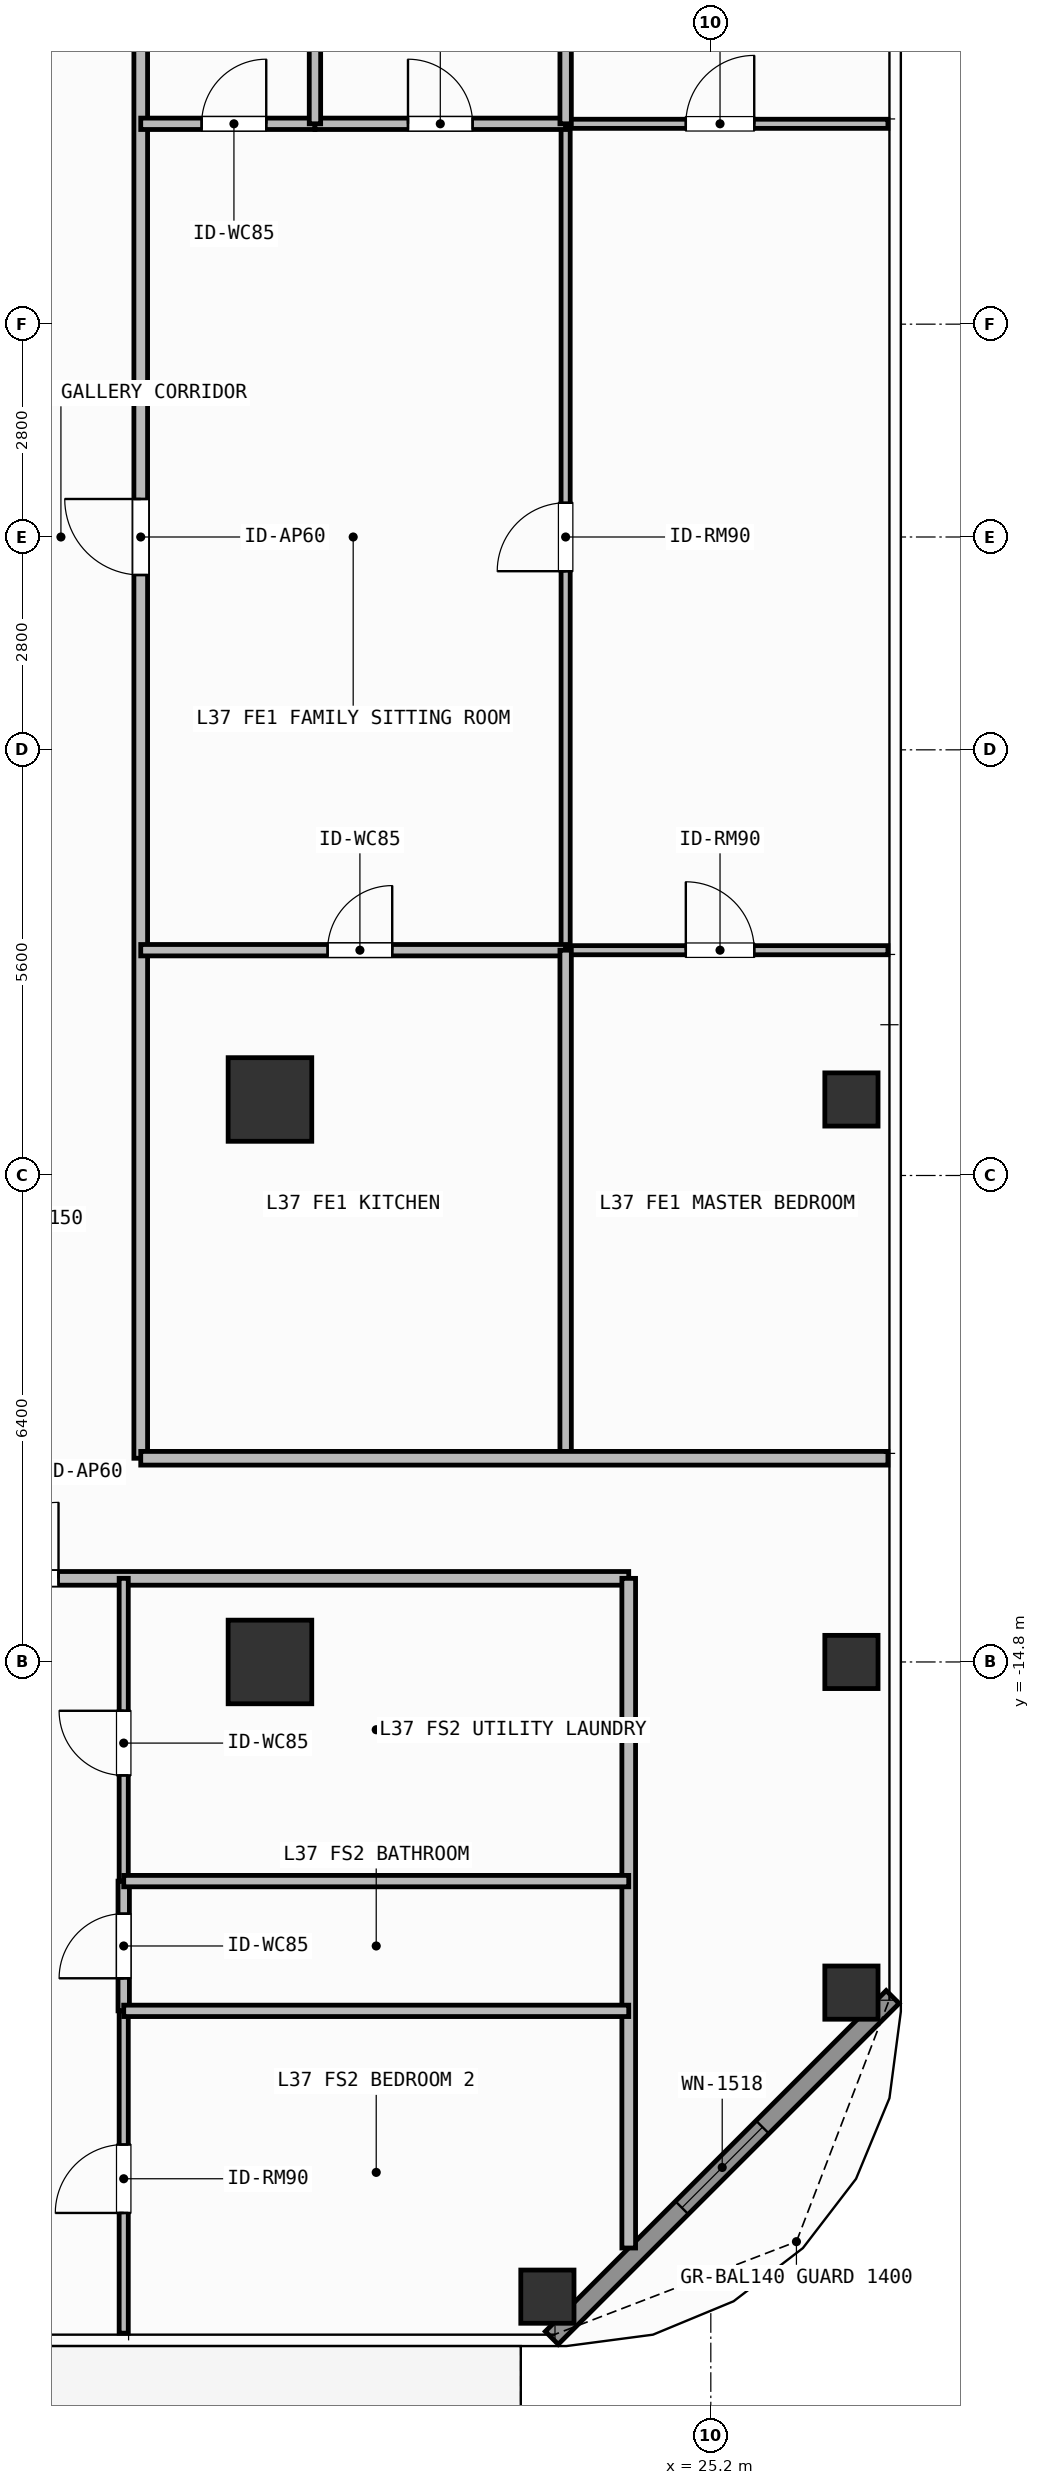
"""IFC4 building model, lengths in metres.
Left out: names, types, materials, properties, quantities, classifications, styles, units other than length and angle.
Written with IfcOpenShell. Run it as: python <this file> out.ifc"""

import sys

from ifc_helpers import new_model, si_unit, direction, frame, frame_2d, origin, origin_2d, place, context, subcontext, project, spatial, rectangle, hollow_rectangle, extrude, element, fill, save


model = new_model("IFC4")
c1 = context("Model", 3, precision=1e-05, world=origin(), true_north=direction((0.0, 1.0)))
c2 = subcontext(c1, "Body", "Model", "MODEL_VIEW")
j1 = project(units=[si_unit("LENGTHUNIT", "METRE"), si_unit("PLANEANGLEUNIT", "RADIAN")], contexts=[c1])
p1 = place(None, origin())
s1 = spatial("IfcSite", under=j1, at=p1, CompositionType="ELEMENT")
p2 = place(p1, origin())
s2 = spatial("IfcBuilding", under=s1, at=p2, CompositionType="ELEMENT")
p3 = place(p2, frame((0.0, 0.0, 148.5)))
s3 = spatial("IfcBuildingStorey", under=s2, at=p3, CompositionType="ELEMENT", Elevation=148.5)
for number, where, z_axis, x_axis in (
    (1, (19.4, -14.8, 0.0), (0.0, 0.0, 1.0), (1.0, 0.0, 0.0)),
    (2, (19.4, -7.4, 0.0), (0.0, 0.0, 1.0), (1.0, 0.0, 0.0)),
):
    element("IfcColumn", number, at=place(p3, frame(where, z_axis=z_axis, x_axis=x_axis)), inside=s3, PredefinedType="COLUMN", context=c2, shape_type="SweptSolid", body=[
        extrude(rectangle(XDim=1.1, YDim=1.1, at=origin_2d()), origin(), (0.0, 0.0, 1.0), 3.9),
    ])
for number, where, z_axis, x_axis in (
    (3, (23.05, -23.15, 0.0), (0.0, 0.0, 1.0), (1.0, 0.0, 0.0)),
    (4, (27.05, -19.15, 0.0), (0.0, 0.0, 1.0), (1.0, 0.0, 0.0)),
    (5, (27.05, -14.8, 0.0), (0.0, 0.0, 1.0), (1.0, 0.0, 0.0)),
    (6, (27.05, -7.4, 0.0), (0.0, 0.0, 1.0), (1.0, 0.0, 0.0)),
):
    element("IfcColumn", number, at=place(p3, frame(where, z_axis=z_axis, x_axis=x_axis)), inside=s3, PredefinedType="COLUMN", context=c2, shape_type="SweptSolid", body=[
        extrude(hollow_rectangle(XDim=0.7, YDim=0.7, WallThickness=0.032, at=origin_2d()), origin(), (0.0, 0.0, 1.0), 3.9),
    ])
p4 = place(p3, frame((27.592, -19.208, 0.0), z_axis=(0.0, 0.0, 1.0), x_axis=(-0.707087534163, -0.707126027686, 0.0)))
e7 = element("IfcWall", 7, at=p4, inside=s3, PredefinedType="SOLIDWALL", context=c2, shape_type="SweptSolid", body=[
    extrude(rectangle(XDim=6.342, YDim=0.24, at=frame_2d((3.171, 0.0))), origin(), (0.0, 0.0, 1.0), 3.68),
])
p5 = place(p4, frame((2.421, 0.0, 0.8)))
e8 = element("IfcOpeningElement", 8, at=p5, cuts=e7, PredefinedType="OPENING", context=c2, shape_type="SweptSolid", body=[
    extrude(rectangle(XDim=1.5, YDim=1.85, at=frame_2d((0.75, 0.925))), frame((0.0, 0.13, 0.0), z_axis=(0.0, -1.0, 0.0), x_axis=(1.0, 0.0, 0.0)), (0.0, 0.0, 1.0), 0.26),
])
p6 = place(p3, frame((6.326, -13.7, 0.0), z_axis=(0.0, 0.0, 1.0), x_axis=(1.0, 0.0, 0.0)))
e9 = element("IfcWall", 9, at=p6, inside=s3, PredefinedType="PARTITIONING", context=c2, shape_type="SweptSolid", body=[
    extrude(rectangle(XDim=17.794, YDim=0.18, at=frame_2d((8.897, 0.0))), origin(), (0.0, 0.0, 1.0), 3.68),
])
p7 = place(p6, frame((9.292, 0.0, 0.0)))
e10 = element("IfcOpeningElement", 10, at=p7, cuts=e9, PredefinedType="OPENING", context=c2, shape_type="SweptSolid", body=[
    extrude(rectangle(XDim=1.0, YDim=2.2, at=frame_2d((0.5, 1.1))), frame((0.0, 0.1, 0.0), z_axis=(0.0, -1.0, 0.0), x_axis=(1.0, 0.0, 0.0)), (0.0, 0.0, 1.0), 0.2),
])
p8 = place(p3, frame((17.476, -19.39, 0.0), z_axis=(0.0, 0.0, 1.0), x_axis=(0.0, 1.0, 0.0)))
e11 = element("IfcWall", 11, at=p8, inside=s3, PredefinedType="PARTITIONING", context=c2, shape_type="SweptSolid", body=[
    extrude(rectangle(XDim=1.707, YDim=0.15, at=frame_2d((0.854, 0.0))), origin(), (0.0, 0.0, 1.0), 3.68),
])
p9 = place(p8, frame((0.428, 0.0, 0.0)))
e12 = element("IfcOpeningElement", 12, at=p9, cuts=e11, PredefinedType="OPENING", context=c2, shape_type="SweptSolid", body=[
    extrude(rectangle(XDim=0.85, YDim=2.1, at=frame_2d((0.425, 1.05))), frame((0.0, 0.085, 0.0), z_axis=(0.0, -1.0, 0.0), x_axis=(1.0, 0.0, 0.0)), (0.0, 0.0, 1.0), 0.17),
])
p10 = place(p3, frame((17.476, -17.683, 0.0), z_axis=(0.0, 0.0, 1.0), x_axis=(0.0, 1.0, 0.0)))
e13 = element("IfcWall", 13, at=p10, inside=s3, PredefinedType="PARTITIONING", context=c2, shape_type="SweptSolid", body=[
    extrude(rectangle(XDim=3.983, YDim=0.12, at=frame_2d((1.992, 0.0))), origin(), (0.0, 0.0, 1.0), 3.68),
])
p11 = place(p10, frame((1.391, 0.0, 0.0)))
e14 = element("IfcOpeningElement", 14, at=p11, cuts=e13, PredefinedType="OPENING", context=c2, shape_type="SweptSolid", body=[
    extrude(rectangle(XDim=0.85, YDim=2.1, at=frame_2d((0.425, 1.05))), frame((0.0, 0.07, 0.0), z_axis=(0.0, -1.0, 0.0), x_axis=(1.0, 0.0, 0.0)), (0.0, 0.0, 1.0), 0.14),
])
p12 = place(p3, frame((17.476, -23.63, 0.0), z_axis=(0.0, 0.0, 1.0), x_axis=(0.0, 1.0, 0.0)))
e15 = element("IfcWall", 15, at=p12, inside=s3, PredefinedType="PARTITIONING", context=c2, shape_type="SweptSolid", body=[
    extrude(rectangle(XDim=4.24, YDim=0.12, at=frame_2d((2.12, 0.0))), origin(), (0.0, 0.0, 1.0), 3.68),
])
p13 = place(p12, frame((1.581, 0.0, 0.0)))
e16 = element("IfcOpeningElement", 16, at=p13, cuts=e15, PredefinedType="OPENING", context=c2, shape_type="SweptSolid", body=[
    extrude(rectangle(XDim=0.9, YDim=2.1, at=frame_2d((0.45, 1.05))), frame((0.0, 0.07, 0.0), z_axis=(0.0, -1.0, 0.0), x_axis=(1.0, 0.0, 0.0)), (0.0, 0.0, 1.0), 0.14),
])
p14 = place(p3, frame((17.7, -12.12, 0.0), z_axis=(0.0, 0.0, 1.0), x_axis=(0.0, 1.0, 0.0)))
e17 = element("IfcWall", 17, at=p14, inside=s3, PredefinedType="PARTITIONING", context=c2, shape_type="SweptSolid", body=[
    extrude(rectangle(XDim=24.24, YDim=0.18, at=frame_2d((12.12, 0.0))), origin(), (0.0, 0.0, 1.0), 3.68),
])
p15 = place(p14, frame((11.62, 0.0, 0.0)))
e18 = element("IfcOpeningElement", 18, at=p15, cuts=e17, PredefinedType="OPENING", context=c2, shape_type="SweptSolid", body=[
    extrude(rectangle(XDim=1.0, YDim=2.2, at=frame_2d((0.5, 1.1))), frame((0.0, 0.1, 0.0), z_axis=(0.0, -1.0, 0.0), x_axis=(1.0, 0.0, 0.0)), (0.0, 0.0, 1.0), 0.2),
])
p16 = place(p3, frame((23.29, -5.436, 0.0), z_axis=(0.0, 0.0, 1.0), x_axis=(0.0, 1.0, 0.0)))
e19 = element("IfcWall", 19, at=p16, inside=s3, PredefinedType="PARTITIONING", context=c2, shape_type="SweptSolid", body=[
    extrude(rectangle(XDim=10.872, YDim=0.12, at=frame_2d((5.436, 0.0))), origin(), (0.0, 0.0, 1.0), 3.68),
])
p17 = place(p16, frame((4.986, 0.0, 0.0)))
e20 = element("IfcOpeningElement", 20, at=p17, cuts=e19, PredefinedType="OPENING", context=c2, shape_type="SweptSolid", body=[
    extrude(rectangle(XDim=0.9, YDim=2.1, at=frame_2d((0.45, 1.05))), frame((0.0, 0.07, 0.0), z_axis=(0.0, -1.0, 0.0), x_axis=(1.0, 0.0, 0.0)), (0.0, 0.0, 1.0), 0.14),
])
p18 = place(p3, frame((17.7, 5.436, 0.0), z_axis=(0.0, 0.0, 1.0), x_axis=(1.0, 0.0, 0.0)))
e21 = element("IfcWall", 21, at=p18, inside=s3, PredefinedType="PARTITIONING", context=c2, shape_type="SweptSolid", body=[
    extrude(rectangle(XDim=2.292, YDim=0.15, at=frame_2d((1.146, 0.0))), origin(), (0.0, 0.0, 1.0), 3.68),
])
p19 = place(p18, frame((0.801, 0.0, 0.0)))
e22 = element("IfcOpeningElement", 22, at=p19, cuts=e21, PredefinedType="OPENING", context=c2, shape_type="SweptSolid", body=[
    extrude(rectangle(XDim=0.85, YDim=2.1, at=frame_2d((0.425, 1.05))), frame((0.0, 0.085, 0.0), z_axis=(0.0, -1.0, 0.0), x_axis=(1.0, 0.0, 0.0)), (0.0, 0.0, 1.0), 0.17),
])
p20 = place(p3, frame((19.992, 5.436, 0.0), z_axis=(0.0, 0.0, 1.0), x_axis=(1.0, 0.0, 0.0)))
e23 = element("IfcWall", 23, at=p20, inside=s3, PredefinedType="PARTITIONING", context=c2, shape_type="SweptSolid", body=[
    extrude(rectangle(XDim=3.298, YDim=0.15, at=frame_2d((1.649, 0.0))), origin(), (0.0, 0.0, 1.0), 3.68),
])
p21 = place(p20, frame((1.224, 0.0, 0.0)))
e24 = element("IfcOpeningElement", 24, at=p21, cuts=e23, PredefinedType="OPENING", context=c2, shape_type="SweptSolid", body=[
    extrude(rectangle(XDim=0.85, YDim=2.1, at=frame_2d((0.425, 1.05))), frame((0.0, 0.085, 0.0), z_axis=(0.0, -1.0, 0.0), x_axis=(1.0, 0.0, 0.0)), (0.0, 0.0, 1.0), 0.17),
])
p22 = place(p3, frame((17.7, -5.436, 0.0), z_axis=(0.0, 0.0, 1.0), x_axis=(1.0, 0.0, 0.0)))
e25 = element("IfcWall", 25, at=p22, inside=s3, PredefinedType="PARTITIONING", context=c2, shape_type="SweptSolid", body=[
    extrude(rectangle(XDim=5.59, YDim=0.15, at=frame_2d((2.795, 0.0))), origin(), (0.0, 0.0, 1.0), 3.68),
])
p23 = place(p22, frame((2.458, 0.0, 0.0)))
e26 = element("IfcOpeningElement", 26, at=p23, cuts=e25, PredefinedType="OPENING", context=c2, shape_type="SweptSolid", body=[
    extrude(rectangle(XDim=0.85, YDim=2.1, at=frame_2d((0.425, 1.05))), frame((0.0, 0.085, 0.0), z_axis=(0.0, -1.0, 0.0), x_axis=(1.0, 0.0, 0.0)), (0.0, 0.0, 1.0), 0.17),
])
p24 = place(p3, frame((23.29, -5.436, 0.0), z_axis=(0.0, 0.0, 1.0), x_axis=(1.0, 0.0, 0.0)))
e27 = element("IfcWall", 27, at=p24, inside=s3, PredefinedType="PARTITIONING", context=c2, shape_type="SweptSolid", body=[
    extrude(rectangle(XDim=4.24, YDim=0.12, at=frame_2d((2.12, 0.0))), origin(), (0.0, 0.0, 1.0), 3.68),
])
p25 = place(p24, frame((1.581, 0.0, 0.0)))
e28 = element("IfcOpeningElement", 28, at=p25, cuts=e27, PredefinedType="OPENING", context=c2, shape_type="SweptSolid", body=[
    extrude(rectangle(XDim=0.9, YDim=2.1, at=frame_2d((0.45, 1.05))), frame((0.0, 0.07, 0.0), z_axis=(0.0, -1.0, 0.0), x_axis=(1.0, 0.0, 0.0)), (0.0, 0.0, 1.0), 0.14),
])
p26 = place(p3, frame((23.29, 5.436, 0.0), z_axis=(0.0, 0.0, 1.0), x_axis=(1.0, 0.0, 0.0)))
e29 = element("IfcWall", 29, at=p26, inside=s3, PredefinedType="PARTITIONING", context=c2, shape_type="SweptSolid", body=[
    extrude(rectangle(XDim=4.24, YDim=0.12, at=frame_2d((2.12, 0.0))), origin(), (0.0, 0.0, 1.0), 3.68),
])
p27 = place(p26, frame((1.581, 0.0, 0.0)))
e30 = element("IfcOpeningElement", 30, at=p27, cuts=e29, PredefinedType="OPENING", context=c2, shape_type="SweptSolid", body=[
    extrude(rectangle(XDim=0.9, YDim=2.1, at=frame_2d((0.45, 1.05))), frame((0.0, 0.07, 0.0), z_axis=(0.0, -1.0, 0.0), x_axis=(1.0, 0.0, 0.0)), (0.0, 0.0, 1.0), 0.14),
])
p28 = place(p3, frame((24.12, -22.51, 0.0), z_axis=(0.0, 0.0, 1.0), x_axis=(0.0, 1.0, 0.0)))
e31 = element("IfcWall", 31, at=p28, inside=s3, PredefinedType="PARTITIONING", context=c2, shape_type="SweptSolid", body=[
    extrude(rectangle(XDim=8.81, YDim=0.18, at=frame_2d((4.405, 0.0))), origin(), (0.0, 0.0, 1.0), 3.68),
])
for number, where, z_axis, x_axis in (
    (32, (17.476, -17.683, 0.0), (0.0, 0.0, 1.0), (1.0, 0.0, 0.0)),
    (33, (17.476, -19.39, 0.0), (0.0, 0.0, 1.0), (1.0, 0.0, 0.0)),
):
    element("IfcWall", number, at=place(p3, frame(where, z_axis=z_axis, x_axis=x_axis)), inside=s3, PredefinedType="PARTITIONING", context=c2, shape_type="SweptSolid", body=[
        extrude(rectangle(XDim=6.644, YDim=0.15, at=frame_2d((3.322, 0.0))), origin(), (0.0, 0.0, 1.0), 3.68),
    ])
for number, where, z_axis, x_axis in (
    (34, (19.992, 5.436, 0.0), (0.0, 0.0, 1.0), (0.0, 1.0, 0.0)),
    (35, (23.29, -12.12, 0.0), (0.0, 0.0, 1.0), (0.0, 1.0, 0.0)),
    (36, (23.29, 5.436, 0.0), (0.0, 0.0, 1.0), (0.0, 1.0, 0.0)),
):
    element("IfcWall", number, at=place(p3, frame(where, z_axis=z_axis, x_axis=x_axis)), inside=s3, PredefinedType="PARTITIONING", context=c2, shape_type="SweptSolid", body=[
        extrude(rectangle(XDim=6.684, YDim=0.15, at=frame_2d((3.342, 0.0))), origin(), (0.0, 0.0, 1.0), 3.68),
    ])
p29 = place(p3, frame((17.7, -12.12, 0.0), z_axis=(0.0, 0.0, 1.0), x_axis=(1.0, 0.0, 0.0)))
e37 = element("IfcWall", 37, at=p29, inside=s3, PredefinedType="PARTITIONING", context=c2, shape_type="SweptSolid", body=[
    extrude(rectangle(XDim=9.83, YDim=0.18, at=frame_2d((4.915, 0.0))), origin(), (0.0, 0.0, 1.0), 3.68),
])
p30 = place(p5, origin())
e38 = element("IfcWindow", 38, at=p30, inside=s3, PartitioningType="SINGLE_PANEL", PredefinedType="WINDOW", context=c2, shape_type="SweptSolid", body=[
    extrude(rectangle(XDim=1.5, YDim=1.85, at=frame_2d((0.75, 0.925))), frame((0.0, 0.03, 0.0), z_axis=(0.0, -1.0, 0.0), x_axis=(1.0, 0.0, 0.0)), (0.0, 0.0, 1.0), 0.06),
])
fill(e8, e38)
p31 = place(p7, origin())
e39 = element("IfcDoor", 39, at=p31, inside=s3, OperationType="SINGLE_SWING_RIGHT", PredefinedType="DOOR", context=c2, shape_type="SweptSolid", body=[
    extrude(rectangle(XDim=1.0, YDim=2.2, at=frame_2d((0.5, 1.1))), frame((0.0, 0.025, 0.0), z_axis=(0.0, -1.0, 0.0), x_axis=(1.0, 0.0, 0.0)), (0.0, 0.0, 1.0), 0.05),
])
fill(e10, e39)
p32 = place(p9, origin())
e40 = element("IfcDoor", 40, at=p32, inside=s3, OperationType="SINGLE_SWING_LEFT", PredefinedType="DOOR", context=c2, shape_type="SweptSolid", body=[
    extrude(rectangle(XDim=0.85, YDim=2.1, at=frame_2d((0.425, 1.05))), frame((0.0, 0.025, 0.0), z_axis=(0.0, -1.0, 0.0), x_axis=(1.0, 0.0, 0.0)), (0.0, 0.0, 1.0), 0.05),
])
fill(e12, e40)
p33 = place(p11, origin())
e41 = element("IfcDoor", 41, at=p33, inside=s3, OperationType="SINGLE_SWING_RIGHT", PredefinedType="DOOR", context=c2, shape_type="SweptSolid", body=[
    extrude(rectangle(XDim=0.85, YDim=2.1, at=frame_2d((0.425, 1.05))), frame((0.0, 0.025, 0.0), z_axis=(0.0, -1.0, 0.0), x_axis=(1.0, 0.0, 0.0)), (0.0, 0.0, 1.0), 0.05),
])
fill(e14, e41)
p34 = place(p13, origin())
e42 = element("IfcDoor", 42, at=p34, inside=s3, OperationType="SINGLE_SWING_LEFT", PredefinedType="DOOR", context=c2, shape_type="SweptSolid", body=[
    extrude(rectangle(XDim=0.9, YDim=2.1, at=frame_2d((0.45, 1.05))), frame((0.0, 0.025, 0.0), z_axis=(0.0, -1.0, 0.0), x_axis=(1.0, 0.0, 0.0)), (0.0, 0.0, 1.0), 0.05),
])
fill(e16, e42)
p35 = place(p15, origin())
e43 = element("IfcDoor", 43, at=p35, inside=s3, OperationType="SINGLE_SWING_RIGHT", PredefinedType="DOOR", context=c2, shape_type="SweptSolid", body=[
    extrude(rectangle(XDim=1.0, YDim=2.2, at=frame_2d((0.5, 1.1))), frame((0.0, 0.025, 0.0), z_axis=(0.0, -1.0, 0.0), x_axis=(1.0, 0.0, 0.0)), (0.0, 0.0, 1.0), 0.05),
])
fill(e18, e43)
p36 = place(p17, origin())
e44 = element("IfcDoor", 44, at=p36, inside=s3, OperationType="SINGLE_SWING_LEFT", PredefinedType="DOOR", context=c2, shape_type="SweptSolid", body=[
    extrude(rectangle(XDim=0.9, YDim=2.1, at=frame_2d((0.45, 1.05))), frame((0.0, 0.025, 0.0), z_axis=(0.0, -1.0, 0.0), x_axis=(1.0, 0.0, 0.0)), (0.0, 0.0, 1.0), 0.05),
])
fill(e20, e44)
p37 = place(p19, origin())
e45 = element("IfcDoor", 45, at=p37, inside=s3, OperationType="SINGLE_SWING_RIGHT", PredefinedType="DOOR", context=c2, shape_type="SweptSolid", body=[
    extrude(rectangle(XDim=0.85, YDim=2.1, at=frame_2d((0.425, 1.05))), frame((0.0, 0.025, 0.0), z_axis=(0.0, -1.0, 0.0), x_axis=(1.0, 0.0, 0.0)), (0.0, 0.0, 1.0), 0.05),
])
fill(e22, e45)
p38 = place(p21, origin())
e46 = element("IfcDoor", 46, at=p38, inside=s3, OperationType="SINGLE_SWING_LEFT", PredefinedType="DOOR", context=c2, shape_type="SweptSolid", body=[
    extrude(rectangle(XDim=0.85, YDim=2.1, at=frame_2d((0.425, 1.05))), frame((0.0, 0.025, 0.0), z_axis=(0.0, -1.0, 0.0), x_axis=(1.0, 0.0, 0.0)), (0.0, 0.0, 1.0), 0.05),
])
fill(e24, e46)
p39 = place(p23, origin())
e47 = element("IfcDoor", 47, at=p39, inside=s3, OperationType="SINGLE_SWING_RIGHT", PredefinedType="DOOR", context=c2, shape_type="SweptSolid", body=[
    extrude(rectangle(XDim=0.85, YDim=2.1, at=frame_2d((0.425, 1.05))), frame((0.0, 0.025, 0.0), z_axis=(0.0, -1.0, 0.0), x_axis=(1.0, 0.0, 0.0)), (0.0, 0.0, 1.0), 0.05),
])
fill(e26, e47)
p40 = place(p25, origin())
e48 = element("IfcDoor", 48, at=p40, inside=s3, OperationType="SINGLE_SWING_LEFT", PredefinedType="DOOR", context=c2, shape_type="SweptSolid", body=[
    extrude(rectangle(XDim=0.9, YDim=2.1, at=frame_2d((0.45, 1.05))), frame((0.0, 0.025, 0.0), z_axis=(0.0, -1.0, 0.0), x_axis=(1.0, 0.0, 0.0)), (0.0, 0.0, 1.0), 0.05),
])
fill(e28, e48)
p41 = place(p27, origin())
e49 = element("IfcDoor", 49, at=p41, inside=s3, OperationType="SINGLE_SWING_RIGHT", PredefinedType="DOOR", context=c2, shape_type="SweptSolid", body=[
    extrude(rectangle(XDim=0.9, YDim=2.1, at=frame_2d((0.45, 1.05))), frame((0.0, 0.025, 0.0), z_axis=(0.0, -1.0, 0.0), x_axis=(1.0, 0.0, 0.0)), (0.0, 0.0, 1.0), 0.05),
])
fill(e30, e49)
save(model, sys.argv[1])
